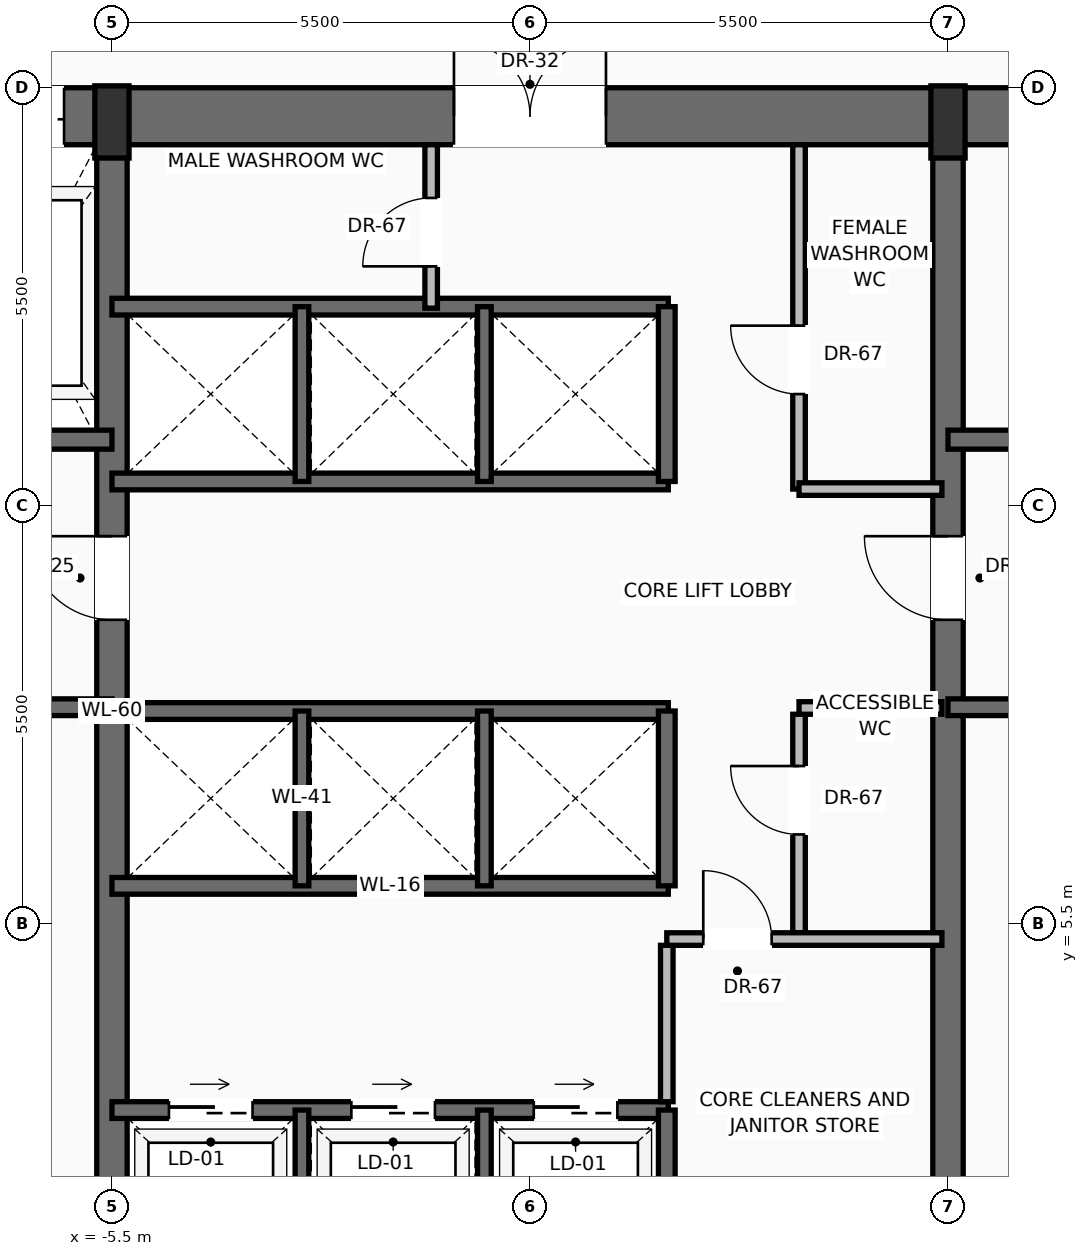
"""IFC4 building model, lengths in metres.
Left out: names, types, materials, properties, quantities, classifications, styles, units other than length and angle.
Written with IfcOpenShell. Run it as: python <this file> out.ifc"""

import sys

from ifc_helpers import new_model, si_unit, direction, frame, frame_2d, origin, origin_2d, place, context, subcontext, project, spatial, rectangle, extrude, source, transform, mapped, element, fill, save


model = new_model("IFC4")
c1 = context("Model", 3, precision=1e-05, world=origin(), true_north=direction((0.0, 1.0)))
c2 = subcontext(c1, "Body", "Model", "MODEL_VIEW")
j1 = project(units=[si_unit("LENGTHUNIT", "METRE"), si_unit("PLANEANGLEUNIT", "RADIAN")], contexts=[c1])
p1 = place(None, origin())
s1 = spatial("IfcSite", under=j1, at=p1, CompositionType="ELEMENT")
p2 = place(p1, origin())
s2 = spatial("IfcBuilding", under=s1, at=p2, CompositionType="ELEMENT")
p3 = place(p2, frame((0.0, 0.0, 98.8)))
s3 = spatial("IfcBuildingStorey", under=s2, at=p3, CompositionType="ELEMENT", Elevation=98.8)
p4 = place(p3, frame((-10.9, 16.125, 0.0), z_axis=(0.0, 0.0, 1.0), x_axis=(1.0, 0.0, 0.0)))
e1 = element("IfcWall", 1, at=p4, inside=s3, PredefinedType="SHEAR", context=c2, shape_type="SweptSolid", body=[
    extrude(rectangle(XDim=21.8, YDim=0.75, at=frame_2d((10.9, 0.0))), origin(), (0.0, 0.0, 1.0), 3.45),
])
p5 = place(p4, frame((3.47, 0.0, 0.0)))
e2 = element("IfcOpeningElement", 2, at=p5, cuts=e1, PredefinedType="OPENING", context=c2, shape_type="SweptSolid", body=[
    extrude(rectangle(XDim=1.3, YDim=2.3, at=frame_2d((0.65, 1.15))), frame((0.0, 0.385, 0.0), z_axis=(0.0, -1.0, 0.0), x_axis=(1.0, 0.0, 0.0)), (0.0, 0.0, 1.0), 0.77),
])
p6 = place(p4, frame((9.9, 0.0, 0.0)))
e3 = element("IfcOpeningElement", 3, at=p6, cuts=e1, PredefinedType="OPENING", context=c2, shape_type="SweptSolid", body=[
    extrude(rectangle(XDim=2.0, YDim=2.4, at=frame_2d((1.0, 1.2))), frame((0.0, 0.385, 0.0), z_axis=(0.0, -1.0, 0.0), x_axis=(1.0, 0.0, 0.0)), (0.0, 0.0, 1.0), 0.77),
])
p7 = place(p3, frame((-5.5, 0.475, 0.0), z_axis=(0.0, 0.0, 1.0), x_axis=(0.0, 1.0, 0.0)))
e4 = element("IfcWall", 4, at=p7, inside=s3, PredefinedType="SHEAR", context=c2, shape_type="SweptSolid", body=[
    extrude(rectangle(XDim=15.65, YDim=0.4, at=frame_2d((7.825, 0.0))), origin(), (0.0, 0.0, 1.0), 3.45),
])
p8 = place(p7, frame((9.025, 0.0, 0.0)))
e5 = element("IfcOpeningElement", 5, at=p8, cuts=e4, PredefinedType="OPENING", context=c2, shape_type="SweptSolid", body=[
    extrude(rectangle(XDim=1.1, YDim=2.2, at=frame_2d((0.55, 1.1))), frame((0.0, 0.21, 0.0), z_axis=(0.0, -1.0, 0.0), x_axis=(1.0, 0.0, 0.0)), (0.0, 0.0, 1.0), 0.42),
])
p9 = place(p3, frame((5.5, 0.475, 0.0), z_axis=(0.0, 0.0, 1.0), x_axis=(0.0, 1.0, 0.0)))
e6 = element("IfcWall", 6, at=p9, inside=s3, PredefinedType="SHEAR", context=c2, shape_type="SweptSolid", body=[
    extrude(rectangle(XDim=15.65, YDim=0.4, at=frame_2d((7.825, 0.0))), origin(), (0.0, 0.0, 1.0), 3.45),
])
p10 = place(p9, frame((9.025, 0.0, 0.0)))
e7 = element("IfcOpeningElement", 7, at=p10, cuts=e6, PredefinedType="OPENING", context=c2, shape_type="SweptSolid", body=[
    extrude(rectangle(XDim=1.1, YDim=2.2, at=frame_2d((0.55, 1.1))), frame((0.0, 0.21, 0.0), z_axis=(0.0, -1.0, 0.0), x_axis=(1.0, 0.0, 0.0)), (0.0, 0.0, 1.0), 0.42),
])
m1 = source(origin(), c2, "Body", "SweptSolid", [
    extrude(rectangle(XDim=0.45, YDim=0.95, at=origin_2d()), origin(), (0.0, 0.0, 1.0), 3.7),
])
for number, where, z_axis, x_axis in (
    (8, (-5.5, 16.05, 0.0), (0.0, 0.0, 1.0), (1.0, 0.0, 0.0)),
    (9, (5.5, 16.05, 0.0), (0.0, 0.0, 1.0), (1.0, 0.0, 0.0)),
):
    element("IfcColumn", number, at=place(p3, frame(where, z_axis=z_axis, x_axis=x_axis)), inside=s3, PredefinedType="PILASTER", context=c2, shape_type="MappedRepresentation", body=[
        mapped(m1, transform((0.0, 0.0, 0.0), scale=1.0)),
    ])
p11 = place(p3, frame((-5.5, 8.35, 0.0), z_axis=(0.0, 0.0, 1.0), x_axis=(-1.0, 0.0, 0.0)))
e10 = element("IfcWall", 10, at=p11, inside=s3, PredefinedType="SOLIDWALL", context=c2, shape_type="SweptSolid", body=[
    extrude(rectangle(XDim=4.65, YDim=0.22, at=frame_2d((2.325, 0.0))), origin(), (0.0, 0.0, 1.0), 3.45),
])
p12 = place(p11, frame((2.5, 0.0, 0.0)))
e11 = element("IfcOpeningElement", 11, at=p12, cuts=e10, PredefinedType="OPENING", context=c2, shape_type="SweptSolid", body=[
    extrude(rectangle(XDim=1.15, YDim=2.2, at=frame_2d((0.575, 1.1))), frame((0.0, 0.12, 0.0), z_axis=(0.0, -1.0, 0.0), x_axis=(1.0, 0.0, 0.0)), (0.0, 0.0, 1.0), 0.24),
])
p13 = place(p3, frame((-5.5, 11.87, 0.0), z_axis=(0.0, 0.0, 1.0), x_axis=(-1.0, 0.0, 0.0)))
e12 = element("IfcWall", 12, at=p13, inside=s3, PredefinedType="SOLIDWALL", context=c2, shape_type="SweptSolid", body=[
    extrude(rectangle(XDim=4.65, YDim=0.25, at=frame_2d((2.325, 0.0))), origin(), (0.0, 0.0, 1.0), 3.45),
])
p14 = place(p13, frame((2.95, 0.0, 0.0)))
e13 = element("IfcOpeningElement", 13, at=p14, cuts=e12, PredefinedType="OPENING", context=c2, shape_type="SweptSolid", body=[
    extrude(rectangle(XDim=1.2, YDim=2.25, at=frame_2d((0.6, 1.125))), frame((0.0, 0.135, 0.0), z_axis=(0.0, -1.0, 0.0), x_axis=(1.0, 0.0, 0.0)), (0.0, 0.0, 1.0), 0.27),
])
p15 = place(p3, frame((10.15, 8.35, 0.0), z_axis=(0.0, 0.0, 1.0), x_axis=(-1.0, 0.0, 0.0)))
e14 = element("IfcWall", 14, at=p15, inside=s3, PredefinedType="SOLIDWALL", context=c2, shape_type="SweptSolid", body=[
    extrude(rectangle(XDim=4.65, YDim=0.22, at=frame_2d((2.325, 0.0))), origin(), (0.0, 0.0, 1.0), 3.45),
])
p16 = place(p15, frame((1.0, 0.0, 0.0)))
e15 = element("IfcOpeningElement", 15, at=p16, cuts=e14, PredefinedType="OPENING", context=c2, shape_type="SweptSolid", body=[
    extrude(rectangle(XDim=1.15, YDim=2.2, at=frame_2d((0.575, 1.1))), frame((0.0, 0.12, 0.0), z_axis=(0.0, -1.0, 0.0), x_axis=(1.0, 0.0, 0.0)), (0.0, 0.0, 1.0), 0.24),
])
p17 = place(p3, frame((10.15, 11.87, 0.0), z_axis=(0.0, 0.0, 1.0), x_axis=(-1.0, 0.0, 0.0)))
e16 = element("IfcWall", 16, at=p17, inside=s3, PredefinedType="SOLIDWALL", context=c2, shape_type="SweptSolid", body=[
    extrude(rectangle(XDim=4.65, YDim=0.25, at=frame_2d((2.325, 0.0))), origin(), (0.0, 0.0, 1.0), 3.45),
])
p18 = place(p17, frame((0.5, 0.0, 0.0)))
e17 = element("IfcOpeningElement", 17, at=p18, cuts=e16, PredefinedType="OPENING", context=c2, shape_type="SweptSolid", body=[
    extrude(rectangle(XDim=1.2, YDim=2.25, at=frame_2d((0.6, 1.125))), frame((0.0, 0.135, 0.0), z_axis=(0.0, -1.0, 0.0), x_axis=(1.0, 0.0, 0.0)), (0.0, 0.0, 1.0), 0.27),
])
p19 = place(p3, frame((-5.5, 3.05, 0.0), z_axis=(0.0, 0.0, 1.0), x_axis=(1.0, 0.0, 0.0)))
e18 = element("IfcWall", 18, at=p19, inside=s3, PredefinedType="SOLIDWALL", context=c2, shape_type="SweptSolid", body=[
    extrude(rectangle(XDim=7.32, YDim=0.22, at=frame_2d((3.66, 0.0))), origin(), (0.0, 0.0, 1.0), 3.45),
])
p20 = place(p19, frame((0.75, 0.0, 0.0)))
e19 = element("IfcOpeningElement", 19, at=p20, cuts=e18, PredefinedType="OPENING", context=c2, shape_type="SweptSolid", body=[
    extrude(rectangle(XDim=1.1, YDim=2.2, at=frame_2d((0.55, 1.1))), frame((0.0, 0.12, 0.0), z_axis=(0.0, -1.0, 0.0), x_axis=(1.0, 0.0, 0.0)), (0.0, 0.0, 1.0), 0.24),
])
p21 = place(p19, frame((3.15, 0.0, 0.0)))
e20 = element("IfcOpeningElement", 20, at=p21, cuts=e18, PredefinedType="OPENING", context=c2, shape_type="SweptSolid", body=[
    extrude(rectangle(XDim=1.1, YDim=2.2, at=frame_2d((0.55, 1.1))), frame((0.0, 0.12, 0.0), z_axis=(0.0, -1.0, 0.0), x_axis=(1.0, 0.0, 0.0)), (0.0, 0.0, 1.0), 0.24),
])
p22 = place(p19, frame((5.55, 0.0, 0.0)))
e21 = element("IfcOpeningElement", 21, at=p22, cuts=e18, PredefinedType="OPENING", context=c2, shape_type="SweptSolid", body=[
    extrude(rectangle(XDim=1.1, YDim=2.2, at=frame_2d((0.55, 1.1))), frame((0.0, 0.12, 0.0), z_axis=(0.0, -1.0, 0.0), x_axis=(1.0, 0.0, 0.0)), (0.0, 0.0, 1.0), 0.24),
])
p23 = place(p3, frame((1.8, 0.85, 0.0), z_axis=(0.0, 0.0, 1.0), x_axis=(0.0, 1.0, 0.0)))
e22 = element("IfcWall", 22, at=p23, inside=s3, PredefinedType="SOLIDWALL", context=c2, shape_type="SweptSolid", body=[
    extrude(rectangle(XDim=2.2, YDim=0.22, at=frame_2d((1.1, 0.0))), origin(), (0.0, 0.0, 1.0), 3.45),
])
for number, where, z_axis, x_axis in (
    (23, (-3.0, 0.85, 0.0), (0.0, 0.0, 1.0), (0.0, 1.0, 0.0)),
    (24, (-0.6, 0.85, 0.0), (0.0, 0.0, 1.0), (0.0, 1.0, 0.0)),
):
    element("IfcWall", number, at=place(p3, frame(where, z_axis=z_axis, x_axis=x_axis)), inside=s3, PredefinedType="SOLIDWALL", context=c2, shape_type="SweptSolid", body=[
        extrude(rectangle(XDim=2.2, YDim=0.18, at=frame_2d((1.1, 0.0))), origin(), (0.0, 0.0, 1.0), 3.45),
    ])
p24 = place(p3, frame((1.8, 3.16, 0.0), z_axis=(0.0, 0.0, 1.0), x_axis=(0.0, 1.0, 0.0)))
e25 = element("IfcWall", 25, at=p24, inside=s3, PredefinedType="PARTITIONING", context=c2, shape_type="SweptSolid", body=[
    extrude(rectangle(XDim=2.058, YDim=0.165, at=frame_2d((1.029, 0.0))), origin(), (0.0, 0.0, 1.0), 3.442),
])
p25 = place(p3, frame((3.54, 5.383, 0.0), z_axis=(0.0, 0.0, 1.0), x_axis=(0.0, 1.0, 0.0)))
e26 = element("IfcWall", 26, at=p25, inside=s3, PredefinedType="PARTITIONING", context=c2, shape_type="SweptSolid", body=[
    extrude(rectangle(XDim=2.875, YDim=0.165, at=frame_2d((1.438, 0.0))), origin(), (0.0, 0.0, 1.0), 3.442),
])
p26 = place(p25, frame((1.294, 0.0, 0.0)))
e27 = element("IfcOpeningElement", 27, at=p26, cuts=e26, PredefinedType="OPENING", context=c2, shape_type="SweptSolid", body=[
    extrude(rectangle(XDim=0.9, YDim=2.1, at=frame_2d((0.45, 1.05))), frame((0.0, 0.093, 0.0), z_axis=(0.0, -1.0, 0.0), x_axis=(1.0, 0.0, 0.0)), (0.0, 0.0, 1.0), 0.185),
])
p27 = place(p3, frame((3.54, 8.34, 0.0), z_axis=(0.0, 0.0, 1.0), x_axis=(1.0, 0.0, 0.0)))
e28 = element("IfcWall", 28, at=p27, inside=s3, PredefinedType="PARTITIONING", context=c2, shape_type="SweptSolid", body=[
    extrude(rectangle(XDim=1.88, YDim=0.165, at=frame_2d((0.94, 0.0))), origin(), (0.0, 0.0, 1.0), 3.442),
])
p28 = place(p3, frame((1.8, 5.3, 0.0), z_axis=(0.0, 0.0, 1.0), x_axis=(1.0, 0.0, 0.0)))
e29 = element("IfcWall", 29, at=p28, inside=s3, PredefinedType="PARTITIONING", context=c2, shape_type="SweptSolid", body=[
    extrude(rectangle(XDim=3.62, YDim=0.165, at=frame_2d((1.81, 0.0))), origin(), (0.0, 0.0, 1.0), 3.442),
])
p29 = place(p28, frame((0.48, 0.0, 0.0)))
e30 = element("IfcOpeningElement", 30, at=p29, cuts=e29, PredefinedType="OPENING", context=c2, shape_type="SweptSolid", body=[
    extrude(rectangle(XDim=0.9, YDim=2.1, at=frame_2d((0.45, 1.05))), frame((0.0, 0.093, 0.0), z_axis=(0.0, -1.0, 0.0), x_axis=(1.0, 0.0, 0.0)), (0.0, 0.0, 1.0), 0.185),
])
for number, where, z_axis, x_axis in (
    (31, (-5.5, 6.0, 0.0), (0.0, 0.0, 1.0), (1.0, 0.0, 0.0)),
    (32, (-5.5, 8.3, 0.0), (0.0, 0.0, 1.0), (1.0, 0.0, 0.0)),
):
    element("IfcWall", number, at=place(p3, frame(where, z_axis=z_axis, x_axis=x_axis)), inside=s3, PredefinedType="SOLIDWALL", context=c2, shape_type="SweptSolid", body=[
        extrude(rectangle(XDim=7.32, YDim=0.22, at=frame_2d((3.66, 0.0))), origin(), (0.0, 0.0, 1.0), 3.45),
    ])
p30 = place(p3, frame((1.8, 6.0, 0.0), z_axis=(0.0, 0.0, 1.0), x_axis=(0.0, 1.0, 0.0)))
e33 = element("IfcWall", 33, at=p30, inside=s3, PredefinedType="SOLIDWALL", context=c2, shape_type="SweptSolid", body=[
    extrude(rectangle(XDim=2.3, YDim=0.22, at=frame_2d((1.15, 0.0))), origin(), (0.0, 0.0, 1.0), 3.45),
])
for number, where, z_axis, x_axis in (
    (34, (-3.0, 6.0, 0.0), (0.0, 0.0, 1.0), (0.0, 1.0, 0.0)),
    (35, (-0.6, 6.0, 0.0), (0.0, 0.0, 1.0), (0.0, 1.0, 0.0)),
):
    element("IfcWall", number, at=place(p3, frame(where, z_axis=z_axis, x_axis=x_axis)), inside=s3, PredefinedType="SOLIDWALL", context=c2, shape_type="SweptSolid", body=[
        extrude(rectangle(XDim=2.3, YDim=0.18, at=frame_2d((1.15, 0.0))), origin(), (0.0, 0.0, 1.0), 3.45),
    ])
for number, where, z_axis, x_axis in (
    (36, (-5.5, 11.32, 0.0), (0.0, 0.0, 1.0), (1.0, 0.0, 0.0)),
    (37, (-5.5, 13.62, 0.0), (0.0, 0.0, 1.0), (1.0, 0.0, 0.0)),
):
    element("IfcWall", number, at=place(p3, frame(where, z_axis=z_axis, x_axis=x_axis)), inside=s3, PredefinedType="SOLIDWALL", context=c2, shape_type="SweptSolid", body=[
        extrude(rectangle(XDim=7.32, YDim=0.22, at=frame_2d((3.66, 0.0))), origin(), (0.0, 0.0, 1.0), 3.45),
    ])
p31 = place(p3, frame((1.8, 11.32, 0.0), z_axis=(0.0, 0.0, 1.0), x_axis=(0.0, 1.0, 0.0)))
e38 = element("IfcWall", 38, at=p31, inside=s3, PredefinedType="SOLIDWALL", context=c2, shape_type="SweptSolid", body=[
    extrude(rectangle(XDim=2.3, YDim=0.22, at=frame_2d((1.15, 0.0))), origin(), (0.0, 0.0, 1.0), 3.45),
])
for number, where, z_axis, x_axis in (
    (39, (-3.0, 11.32, 0.0), (0.0, 0.0, 1.0), (0.0, 1.0, 0.0)),
    (40, (-0.6, 11.32, 0.0), (0.0, 0.0, 1.0), (0.0, 1.0, 0.0)),
):
    element("IfcWall", number, at=place(p3, frame(where, z_axis=z_axis, x_axis=x_axis)), inside=s3, PredefinedType="SOLIDWALL", context=c2, shape_type="SweptSolid", body=[
        extrude(rectangle(XDim=2.3, YDim=0.18, at=frame_2d((1.15, 0.0))), origin(), (0.0, 0.0, 1.0), 3.45),
    ])
p32 = place(p3, frame((-1.3, 13.6, 0.0), z_axis=(0.0, 0.0, 1.0), x_axis=(0.0, 1.0, 0.0)))
e41 = element("IfcWall", 41, at=p32, inside=s3, PredefinedType="PARTITIONING", context=c2, shape_type="SweptSolid", body=[
    extrude(rectangle(XDim=2.15, YDim=0.165, at=frame_2d((1.075, 0.0))), origin(), (0.0, 0.0, 1.0), 3.442),
])
p33 = place(p32, frame((0.55, 0.0, 0.0)))
e42 = element("IfcOpeningElement", 42, at=p33, cuts=e41, PredefinedType="OPENING", context=c2, shape_type="SweptSolid", body=[
    extrude(rectangle(XDim=0.9, YDim=2.1, at=frame_2d((0.45, 1.05))), frame((0.0, 0.093, 0.0), z_axis=(0.0, -1.0, 0.0), x_axis=(1.0, 0.0, 0.0)), (0.0, 0.0, 1.0), 0.185),
])
p34 = place(p3, frame((3.54, 11.22, 0.0), z_axis=(0.0, 0.0, 1.0), x_axis=(0.0, 1.0, 0.0)))
e43 = element("IfcWall", 43, at=p34, inside=s3, PredefinedType="PARTITIONING", context=c2, shape_type="SweptSolid", body=[
    extrude(rectangle(XDim=4.53, YDim=0.165, at=frame_2d((2.265, 0.0))), origin(), (0.0, 0.0, 1.0), 3.442),
])
p35 = place(p34, frame((1.25, 0.0, 0.0)))
e44 = element("IfcOpeningElement", 44, at=p35, cuts=e43, PredefinedType="OPENING", context=c2, shape_type="SweptSolid", body=[
    extrude(rectangle(XDim=0.9, YDim=2.1, at=frame_2d((0.45, 1.05))), frame((0.0, 0.093, 0.0), z_axis=(0.0, -1.0, 0.0), x_axis=(1.0, 0.0, 0.0)), (0.0, 0.0, 1.0), 0.185),
])
p36 = place(p3, frame((3.54, 11.22, 0.0), z_axis=(0.0, 0.0, 1.0), x_axis=(1.0, 0.0, 0.0)))
e45 = element("IfcWall", 45, at=p36, inside=s3, PredefinedType="PARTITIONING", context=c2, shape_type="SweptSolid", body=[
    extrude(rectangle(XDim=1.88, YDim=0.165, at=frame_2d((0.94, 0.0))), origin(), (0.0, 0.0, 1.0), 3.442),
])
m2 = source(origin(), c2, "Body", "SweptSolid", [
    extrude(rectangle(XDim=1.1, YDim=2.2, at=frame_2d((0.55, 1.1))), frame((0.0, 0.025, 0.0), z_axis=(0.0, -1.0, 0.0), x_axis=(1.0, 0.0, 0.0)), (0.0, 0.0, 1.0), 0.05),
])
p37 = place(p8, origin())
e46 = element("IfcDoor", 46, at=p37, inside=s3, OperationType="SINGLE_SWING_RIGHT", PredefinedType="DOOR", context=c2, shape_type="MappedRepresentation", body=[
    mapped(m2, transform((0.0, 0.0, 0.0), scale=1.0)),
])
fill(e5, e46)
m3 = source(origin(), c2, "Body", "SweptSolid", [
    extrude(rectangle(XDim=1.3, YDim=2.3, at=frame_2d((0.65, 1.15))), frame((0.0, 0.025, 0.0), z_axis=(0.0, -1.0, 0.0), x_axis=(1.0, 0.0, 0.0)), (0.0, 0.0, 1.0), 0.05),
])
p38 = place(p5, origin())
e47 = element("IfcDoor", 47, at=p38, inside=s3, OperationType="SLIDING_TO_RIGHT", PredefinedType="DOOR", context=c2, shape_type="MappedRepresentation", body=[
    mapped(m3, transform((0.0, 0.0, 0.0), scale=1.0)),
])
fill(e2, e47)
p39 = place(p10, origin())
e48 = element("IfcDoor", 48, at=p39, inside=s3, OperationType="SINGLE_SWING_RIGHT", PredefinedType="DOOR", context=c2, shape_type="MappedRepresentation", body=[
    mapped(m2, transform((0.0, 0.0, 0.0), scale=1.0)),
])
fill(e7, e48)
m4 = source(origin(), c2, "Body", "SweptSolid", [
    extrude(rectangle(XDim=2.0, YDim=2.4, at=frame_2d((1.0, 1.2))), frame((0.0, 0.025, 0.0), z_axis=(0.0, -1.0, 0.0), x_axis=(1.0, 0.0, 0.0)), (0.0, 0.0, 1.0), 0.05),
])
p40 = place(p6, origin())
e49 = element("IfcDoor", 49, at=p40, inside=s3, OperationType="DOUBLE_DOOR_SINGLE_SWING", PredefinedType="DOOR", context=c2, shape_type="MappedRepresentation", body=[
    mapped(m4, transform((0.0, 0.0, 0.0), scale=1.0)),
])
fill(e3, e49)
m5 = source(origin(), c2, "Body", "SweptSolid", [
    extrude(rectangle(XDim=1.1, YDim=2.2, at=frame_2d((0.55, 1.1))), frame((0.0, 0.025, 0.0), z_axis=(0.0, -1.0, 0.0), x_axis=(1.0, 0.0, 0.0)), (0.0, 0.0, 1.0), 0.05),
])
p41 = place(p20, origin())
e50 = element("IfcDoor", 50, at=p41, inside=s3, OperationType="SLIDING_TO_RIGHT", PredefinedType="DOOR", context=c2, shape_type="MappedRepresentation", body=[
    mapped(m5, transform((0.0, 0.0, 0.0), scale=1.0)),
])
fill(e19, e50)
p42 = place(p21, origin())
e51 = element("IfcDoor", 51, at=p42, inside=s3, OperationType="SLIDING_TO_RIGHT", PredefinedType="DOOR", context=c2, shape_type="MappedRepresentation", body=[
    mapped(m5, transform((0.0, 0.0, 0.0), scale=1.0)),
])
fill(e20, e51)
p43 = place(p22, origin())
e52 = element("IfcDoor", 52, at=p43, inside=s3, OperationType="SLIDING_TO_RIGHT", PredefinedType="DOOR", context=c2, shape_type="MappedRepresentation", body=[
    mapped(m5, transform((0.0, 0.0, 0.0), scale=1.0)),
])
fill(e21, e52)
m6 = source(origin(), c2, "Body", "SweptSolid", [
    extrude(rectangle(XDim=0.9, YDim=2.1, at=frame_2d((0.45, 1.05))), frame((0.0, 0.025, 0.0), z_axis=(0.0, -1.0, 0.0), x_axis=(1.0, 0.0, 0.0)), (0.0, 0.0, 1.0), 0.05),
])
p44 = place(p29, origin())
e53 = element("IfcDoor", 53, at=p44, inside=s3, OperationType="SINGLE_SWING_LEFT", PredefinedType="DOOR", context=c2, shape_type="MappedRepresentation", body=[
    mapped(m6, transform((0.0, 0.0, 0.0), scale=1.0)),
])
fill(e30, e53)
p45 = place(p26, origin())
e54 = element("IfcDoor", 54, at=p45, inside=s3, OperationType="SINGLE_SWING_RIGHT", PredefinedType="DOOR", context=c2, shape_type="MappedRepresentation", body=[
    mapped(m6, transform((0.0, 0.0, 0.0), scale=1.0)),
])
fill(e27, e54)
p46 = place(p33, origin())
e55 = element("IfcDoor", 55, at=p46, inside=s3, OperationType="SINGLE_SWING_LEFT", PredefinedType="DOOR", context=c2, shape_type="MappedRepresentation", body=[
    mapped(m6, transform((0.0, 0.0, 0.0), scale=1.0)),
])
fill(e42, e55)
p47 = place(p35, origin())
e56 = element("IfcDoor", 56, at=p47, inside=s3, OperationType="SINGLE_SWING_RIGHT", PredefinedType="DOOR", context=c2, shape_type="MappedRepresentation", body=[
    mapped(m6, transform((0.0, 0.0, 0.0), scale=1.0)),
])
fill(e44, e56)
save(model, sys.argv[1])
